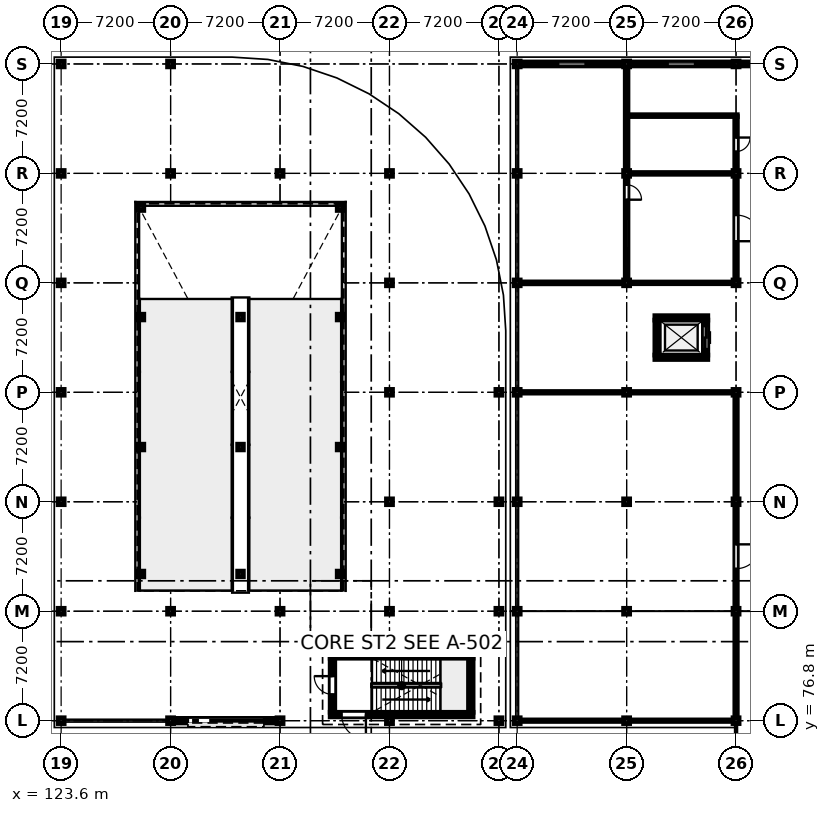
"""IFC4 building model, lengths in metres.
Left out: names, types, materials, properties, quantities, classifications, styles, units other than length and angle.
Written with IfcOpenShell. Run it as: python <this file> out.ifc"""

import sys

from ifc_helpers import new_model, si_unit, direction, frame, frame_2d, origin, origin_2d, place, context, subcontext, project, spatial, rectangle, i_section, extrude, element, fill, save


model = new_model("IFC4")
c1 = context("Model", 3, precision=1e-05, world=origin(), true_north=direction((0.0, 1.0)))
c2 = subcontext(c1, "Body", "Model", "MODEL_VIEW")
j1 = project(units=[si_unit("LENGTHUNIT", "METRE"), si_unit("PLANEANGLEUNIT", "RADIAN")], contexts=[c1])
p1 = place(None, origin())
s1 = spatial("IfcSite", under=j1, at=p1, CompositionType="ELEMENT")
p2 = place(p1, origin())
s2 = spatial("IfcBuilding", under=s1, at=p2, CompositionType="ELEMENT")
p3 = place(p2, origin())
s3 = spatial("IfcBuildingStorey", under=s2, at=p3, CompositionType="ELEMENT", Elevation=0.0)
for number, where, z_axis, x_axis in (
    (1, (123.6, 76.8, 0.0), (0.0, 0.0, 1.0), (1.0, 0.0, 0.0)),
    (2, (123.6, 84.0, 0.0), (0.0, 0.0, 1.0), (1.0, 0.0, 0.0)),
    (3, (123.6, 91.2, 0.0), (0.0, 0.0, 1.0), (1.0, 0.0, 0.0)),
    (4, (123.6, 98.4, 0.0), (0.0, 0.0, 1.0), (1.0, 0.0, 0.0)),
    (5, (123.6, 105.6, 0.0), (0.0, 0.0, 1.0), (1.0, 0.0, 0.0)),
    (6, (123.6, 112.8, 0.0), (0.0, 0.0, 1.0), (1.0, 0.0, 0.0)),
    (7, (123.6, 120.0, 0.0), (0.0, 0.0, 1.0), (1.0, 0.0, 0.0)),
    (8, (130.8, 76.8, 0.0), (0.0, 0.0, 1.0), (1.0, 0.0, 0.0)),
    (9, (130.8, 84.0, 0.0), (0.0, 0.0, 1.0), (1.0, 0.0, 0.0)),
    (10, (130.8, 112.8, 0.0), (0.0, 0.0, 1.0), (1.0, 0.0, 0.0)),
    (11, (130.8, 120.0, 0.0), (0.0, 0.0, 1.0), (1.0, 0.0, 0.0)),
    (12, (138.0, 76.8, 0.0), (0.0, 0.0, 1.0), (1.0, 0.0, 0.0)),
    (13, (138.0, 84.0, 0.0), (0.0, 0.0, 1.0), (1.0, 0.0, 0.0)),
    (14, (138.0, 112.8, 0.0), (0.0, 0.0, 1.0), (1.0, 0.0, 0.0)),
    (15, (145.2, 76.8, 0.0), (0.0, 0.0, 1.0), (1.0, 0.0, 0.0)),
    (16, (145.2, 84.0, 0.0), (0.0, 0.0, 1.0), (1.0, 0.0, 0.0)),
    (17, (145.2, 91.2, 0.0), (0.0, 0.0, 1.0), (1.0, 0.0, 0.0)),
    (18, (145.2, 98.4, 0.0), (0.0, 0.0, 1.0), (1.0, 0.0, 0.0)),
    (19, (145.2, 105.6, 0.0), (0.0, 0.0, 1.0), (1.0, 0.0, 0.0)),
    (20, (145.2, 112.8, 0.0), (0.0, 0.0, 1.0), (1.0, 0.0, 0.0)),
    (21, (152.4, 76.8, 0.0), (0.0, 0.0, 1.0), (1.0, 0.0, 0.0)),
    (22, (152.4, 84.0, 0.0), (0.0, 0.0, 1.0), (1.0, 0.0, 0.0)),
    (23, (152.4, 91.2, 0.0), (0.0, 0.0, 1.0), (1.0, 0.0, 0.0)),
    (24, (152.4, 98.4, 0.0), (0.0, 0.0, 1.0), (1.0, 0.0, 0.0)),
):
    element("IfcColumn", number, at=place(p3, frame(where, z_axis=z_axis, x_axis=x_axis)), inside=s3, PredefinedType="COLUMN", context=c2, shape_type="SweptSolid", body=[
        extrude(i_section(OverallWidth=0.396, OverallDepth=0.381, WebThickness=0.019, FlangeThickness=0.03, FilletRadius=0.015, at=origin_2d()), origin(), (0.0, 0.0, 1.0), 5.4),
    ])
for number, where, z_axis, x_axis in (
    (25, (128.85, 86.45, 0.0), (0.0, 0.0, 1.0), (1.0, 0.0, 0.0)),
    (26, (135.4, 86.45, 0.0), (0.0, 0.0, 1.0), (1.0, 0.0, 0.0)),
    (27, (141.95, 86.45, 0.0), (0.0, 0.0, 1.0), (1.0, 0.0, 0.0)),
    (28, (128.85, 94.8, 0.0), (0.0, 0.0, 1.0), (1.0, 0.0, 0.0)),
    (29, (135.4, 94.8, 0.0), (0.0, 0.0, 1.0), (1.0, 0.0, 0.0)),
    (30, (141.95, 94.8, 0.0), (0.0, 0.0, 1.0), (1.0, 0.0, 0.0)),
    (31, (128.85, 103.35, 0.0), (0.0, 0.0, 1.0), (1.0, 0.0, 0.0)),
    (32, (135.4, 103.35, 0.0), (0.0, 0.0, 1.0), (1.0, 0.0, 0.0)),
    (33, (141.95, 103.35, 0.0), (0.0, 0.0, 1.0), (1.0, 0.0, 0.0)),
    (34, (128.85, 110.55, 0.0), (0.0, 0.0, 1.0), (1.0, 0.0, 0.0)),
    (35, (141.95, 110.55, 0.0), (0.0, 0.0, 1.0), (1.0, 0.0, 0.0)),
):
    element("IfcColumn", number, at=place(p3, frame(where, z_axis=z_axis, x_axis=x_axis)), inside=s3, PredefinedType="COLUMN", context=c2, shape_type="SweptSolid", body=[
        extrude(i_section(OverallWidth=0.373, OverallDepth=0.373, WebThickness=0.016, FlangeThickness=0.026, FilletRadius=0.015, at=origin_2d()), origin(), (0.0, 0.0, 1.0), 5.4),
    ])
for number, where, z_axis, x_axis in (
    (36, (153.6, 76.8, 0.0), (0.0, 0.0, 1.0), (1.0, 0.0, 0.0)),
    (37, (153.6, 84.0, 0.0), (0.0, 0.0, 1.0), (1.0, 0.0, 0.0)),
    (38, (153.6, 91.2, 0.0), (0.0, 0.0, 1.0), (1.0, 0.0, 0.0)),
    (39, (153.6, 98.4, 0.0), (0.0, 0.0, 1.0), (1.0, 0.0, 0.0)),
    (40, (153.6, 105.6, 0.0), (0.0, 0.0, 1.0), (1.0, 0.0, 0.0)),
    (41, (153.6, 112.8, 0.0), (0.0, 0.0, 1.0), (1.0, 0.0, 0.0)),
    (42, (153.6, 120.0, 0.0), (0.0, 0.0, 1.0), (1.0, 0.0, 0.0)),
    (43, (160.8, 76.8, 0.0), (0.0, 0.0, 1.0), (1.0, 0.0, 0.0)),
    (44, (160.8, 84.0, 0.0), (0.0, 0.0, 1.0), (1.0, 0.0, 0.0)),
    (45, (160.8, 91.2, 0.0), (0.0, 0.0, 1.0), (1.0, 0.0, 0.0)),
    (46, (160.8, 98.4, 0.0), (0.0, 0.0, 1.0), (1.0, 0.0, 0.0)),
    (47, (160.8, 105.6, 0.0), (0.0, 0.0, 1.0), (1.0, 0.0, 0.0)),
    (48, (160.8, 112.8, 0.0), (0.0, 0.0, 1.0), (1.0, 0.0, 0.0)),
    (49, (160.8, 120.0, 0.0), (0.0, 0.0, 1.0), (1.0, 0.0, 0.0)),
    (50, (168.0, 76.8, 0.0), (0.0, 0.0, 1.0), (1.0, 0.0, 0.0)),
    (51, (168.0, 84.0, 0.0), (0.0, 0.0, 1.0), (1.0, 0.0, 0.0)),
    (52, (168.0, 91.2, 0.0), (0.0, 0.0, 1.0), (1.0, 0.0, 0.0)),
    (53, (168.0, 98.4, 0.0), (0.0, 0.0, 1.0), (1.0, 0.0, 0.0)),
    (54, (168.0, 105.6, 0.0), (0.0, 0.0, 1.0), (1.0, 0.0, 0.0)),
    (55, (168.0, 112.8, 0.0), (0.0, 0.0, 1.0), (1.0, 0.0, 0.0)),
    (56, (168.0, 120.0, 0.0), (0.0, 0.0, 1.0), (1.0, 0.0, 0.0)),
):
    element("IfcColumn", number, at=place(p3, frame(where, z_axis=z_axis, x_axis=x_axis)), inside=s3, PredefinedType="COLUMN", context=c2, shape_type="SweptSolid", body=[
        extrude(i_section(OverallWidth=0.396, OverallDepth=0.381, WebThickness=0.019, FlangeThickness=0.03, FilletRadius=0.015, at=origin_2d()), origin(), (0.0, 0.0, 1.0), 5.4),
    ])
p4 = place(p3, frame((137.795, 76.8, 0.0), z_axis=(0.0, 0.0, 1.0), x_axis=(-1.0, 0.0, 0.0)))
e57 = element("IfcWall", 57, at=p4, inside=s3, PredefinedType="STANDARD", context=c2, shape_type="SweptSolid", body=[
    extrude(rectangle(XDim=6.79, YDim=0.3, at=frame_2d((3.395, 0.0))), origin(), (0.0, 0.0, 1.0), 4.523),
])
p5 = place(p4, frame((0.855, 0.0, 0.0)))
e58 = element("IfcOpeningElement", 58, at=p5, cuts=e57, PredefinedType="OPENING", context=c2, shape_type="SweptSolid", body=[
    extrude(rectangle(XDim=5.0, YDim=4.1, at=frame_2d((2.5, 2.05))), frame((0.0, 0.16, 0.0), z_axis=(0.0, -1.0, 0.0), x_axis=(1.0, 0.0, 0.0)), (0.0, 0.0, 1.0), 0.32),
])
p6 = place(p3, frame((153.805, 120.0, 0.0), z_axis=(0.0, 0.0, 1.0), x_axis=(1.0, 0.0, 0.0)))
e59 = element("IfcWall", 59, at=p6, inside=s3, PredefinedType="STANDARD", context=c2, shape_type="SweptSolid", body=[
    extrude(rectangle(XDim=6.79, YDim=0.26, at=frame_2d((3.395, 0.0))), origin(), (0.0, 0.0, 1.0), 4.442),
])
p7 = place(p6, frame((2.495, 0.0, 0.9)))
e60 = element("IfcOpeningElement", 60, at=p7, cuts=e59, PredefinedType="OPENING", context=c2, shape_type="SweptSolid", body=[
    extrude(rectangle(XDim=1.8, YDim=1.5, at=frame_2d((0.9, 0.75))), frame((0.0, 0.14, 0.0), z_axis=(0.0, -1.0, 0.0), x_axis=(1.0, 0.0, 0.0)), (0.0, 0.0, 1.0), 0.28),
])
p8 = place(p3, frame((161.005, 120.0, 0.0), z_axis=(0.0, 0.0, 1.0), x_axis=(1.0, 0.0, 0.0)))
e61 = element("IfcWall", 61, at=p8, inside=s3, PredefinedType="STANDARD", context=c2, shape_type="SweptSolid", body=[
    extrude(rectangle(XDim=6.79, YDim=0.26, at=frame_2d((3.395, 0.0))), origin(), (0.0, 0.0, 1.0), 4.442),
])
p9 = place(p8, frame((2.495, 0.0, 0.9)))
e62 = element("IfcOpeningElement", 62, at=p9, cuts=e61, PredefinedType="OPENING", context=c2, shape_type="SweptSolid", body=[
    extrude(rectangle(XDim=1.8, YDim=1.5, at=frame_2d((0.9, 0.75))), frame((0.0, 0.14, 0.0), z_axis=(0.0, -1.0, 0.0), x_axis=(1.0, 0.0, 0.0)), (0.0, 0.0, 1.0), 0.28),
])
p10 = place(p3, frame((168.205, 120.0, 0.0), z_axis=(0.0, 0.0, 1.0), x_axis=(1.0, 0.0, 0.0)))
e63 = element("IfcWall", 63, at=p10, inside=s3, PredefinedType="STANDARD", context=c2, shape_type="SweptSolid", body=[
    extrude(rectangle(XDim=6.79, YDim=0.26, at=frame_2d((3.395, 0.0))), origin(), (0.0, 0.0, 1.0), 4.442),
])
p11 = place(p10, frame((2.495, 0.0, 0.9)))
e64 = element("IfcOpeningElement", 64, at=p11, cuts=e63, PredefinedType="OPENING", context=c2, shape_type="SweptSolid", body=[
    extrude(rectangle(XDim=1.8, YDim=1.5, at=frame_2d((0.9, 0.75))), frame((0.0, 0.14, 0.0), z_axis=(0.0, -1.0, 0.0), x_axis=(1.0, 0.0, 0.0)), (0.0, 0.0, 1.0), 0.28),
])
p12 = place(p3, frame((150.7, 77.2, 0.0), z_axis=(0.0, 0.0, 1.0), x_axis=(-1.0, 0.0, 0.0)))
e65 = element("IfcWall", 65, at=p12, inside=s3, PredefinedType="SOLIDWALL", context=c2, shape_type="SweptSolid", body=[
    extrude(rectangle(XDim=9.4, YDim=0.3, at=frame_2d((4.7, 0.0))), origin(), (0.0, 0.0, 1.0), 5.15),
])
p13 = place(p12, frame((7.05, 0.0, 0.0)))
e66 = element("IfcOpeningElement", 66, at=p13, cuts=e65, PredefinedType="OPENING", context=c2, shape_type="SweptSolid", body=[
    extrude(rectangle(XDim=1.6, YDim=2.15, at=frame_2d((0.8, 1.075))), frame((0.0, 0.16, 0.0), z_axis=(0.0, -1.0, 0.0), x_axis=(1.0, 0.0, 0.0)), (0.0, 0.0, 1.0), 0.32),
])
p14 = place(p3, frame((141.3, 81.06, 0.0), z_axis=(0.0, 0.0, 1.0), x_axis=(1.0, 0.0, 0.0)))
e67 = element("IfcWall", 67, at=p14, inside=s3, PredefinedType="SOLIDWALL", context=c2, shape_type="SweptSolid", body=[
    extrude(rectangle(XDim=9.4, YDim=0.3, at=frame_2d((4.7, 0.0))), origin(), (0.0, 0.0, 1.0), 5.15),
])
p15 = place(p3, frame((141.45, 77.35, 0.0), z_axis=(0.0, 0.0, 1.0), x_axis=(0.0, 1.0, 0.0)))
e68 = element("IfcWall", 68, at=p15, inside=s3, PredefinedType="SOLIDWALL", context=c2, shape_type="SweptSolid", body=[
    extrude(rectangle(XDim=3.56, YDim=0.3, at=frame_2d((1.78, 0.0))), origin(), (0.0, 0.0, 1.0), 5.15),
])
p16 = place(p15, frame((1.18, 0.0, 0.0)))
e69 = element("IfcOpeningElement", 69, at=p16, cuts=e68, PredefinedType="OPENING", context=c2, shape_type="SweptSolid", body=[
    extrude(rectangle(XDim=1.2, YDim=2.2, at=frame_2d((0.6, 1.1))), frame((0.0, 0.16, 0.0), z_axis=(0.0, -1.0, 0.0), x_axis=(1.0, 0.0, 0.0)), (0.0, 0.0, 1.0), 0.32),
])
p17 = place(p3, frame((150.55, 80.91, 0.0), z_axis=(0.0, 0.0, 1.0), x_axis=(0.0, -1.0, 0.0)))
e70 = element("IfcWall", 70, at=p17, inside=s3, PredefinedType="SOLIDWALL", context=c2, shape_type="SweptSolid", body=[
    extrude(rectangle(XDim=3.56, YDim=0.3, at=frame_2d((1.78, 0.0))), origin(), (0.0, 0.0, 1.0), 5.15),
])
for number, where, z_axis, x_axis in (
    (71, (166.14, 100.705, 0.0), (0.0, 0.0, 1.0), (-1.0, 0.0, 0.0)),
    (72, (162.66, 103.295, 0.0), (0.0, 0.0, 1.0), (1.0, 0.0, 0.0)),
):
    element("IfcWall", number, at=place(p3, frame(where, z_axis=z_axis, x_axis=x_axis)), inside=s3, PredefinedType="SHEAR", context=c2, shape_type="SweptSolid", body=[
        extrude(rectangle(XDim=3.48, YDim=0.29, at=frame_2d((1.74, 0.0))), origin(), (0.0, 0.0, 1.0), 5.14),
    ])
p18 = place(p3, frame((162.805, 100.85, 0.0), z_axis=(0.0, 0.0, 1.0), x_axis=(0.0, 1.0, 0.0)))
e73 = element("IfcWall", 73, at=p18, inside=s3, PredefinedType="SHEAR", context=c2, shape_type="SweptSolid", body=[
    extrude(rectangle(XDim=2.3, YDim=0.29, at=frame_2d((1.15, 0.0))), origin(), (0.0, 0.0, 1.0), 5.14),
])
p19 = place(p3, frame((165.995, 103.15, 0.0), z_axis=(0.0, 0.0, 1.0), x_axis=(0.0, -1.0, 0.0)))
e74 = element("IfcWall", 74, at=p19, inside=s3, PredefinedType="SHEAR", context=c2, shape_type="SweptSolid", body=[
    extrude(rectangle(XDim=2.3, YDim=0.29, at=frame_2d((1.15, 0.0))), origin(), (0.0, 0.0, 1.0), 5.14),
])
p20 = place(p19, frame((0.4, 0.0, 0.0)))
e75 = element("IfcOpeningElement", 75, at=p20, cuts=e74, PredefinedType="OPENING", context=c2, shape_type="SweptSolid", body=[
    extrude(rectangle(XDim=1.5, YDim=2.3, at=frame_2d((0.75, 1.15))), frame((0.0, 0.155, 0.0), z_axis=(0.0, -1.0, 0.0), x_axis=(1.0, 0.0, 0.0)), (0.0, 0.0, 1.0), 0.31),
])
p21 = place(p3, frame((168.08, 76.8, 0.0), z_axis=(0.0, 0.0, 1.0), x_axis=(-1.0, 0.0, 0.0)))
e76 = element("IfcWall", 76, at=p21, inside=s3, PredefinedType="PARTITIONING", context=c2, shape_type="SweptSolid", body=[
    extrude(rectangle(XDim=14.348, YDim=0.1, at=frame_2d((7.174, 0.0))), origin(), (0.0, 0.0, 1.0), 4.437),
])
p22 = place(p3, frame((153.732, 98.4, 0.0), z_axis=(0.0, 0.0, 1.0), x_axis=(1.0, 0.0, 0.0)))
e77 = element("IfcWall", 77, at=p22, inside=s3, PredefinedType="PARTITIONING", context=c2, shape_type="SweptSolid", body=[
    extrude(rectangle(XDim=14.348, YDim=0.105, at=frame_2d((7.174, 0.0))), origin(), (0.0, 0.0, 1.0), 4.437),
])
p23 = place(p3, frame((168.08, 105.6, 0.0), z_axis=(0.0, 0.0, 1.0), x_axis=(-1.0, 0.0, 0.0)))
e78 = element("IfcWall", 78, at=p23, inside=s3, PredefinedType="PARTITIONING", context=c2, shape_type="SweptSolid", body=[
    extrude(rectangle(XDim=7.36, YDim=0.11, at=frame_2d((3.68, 0.0))), origin(), (0.0, 0.0, 1.0), 4.437),
])
p24 = place(p3, frame((160.895, 112.8, 0.0), z_axis=(0.0, 0.0, 1.0), x_axis=(1.0, 0.0, 0.0)))
e79 = element("IfcWall", 79, at=p24, inside=s3, PredefinedType="PARTITIONING", context=c2, shape_type="SweptSolid", body=[
    extrude(rectangle(XDim=7.185, YDim=0.115, at=frame_2d((3.593, 0.0))), origin(), (0.0, 0.0, 1.0), 4.437),
])
p25 = place(p3, frame((160.895, 116.6, 0.0), z_axis=(0.0, 0.0, 1.0), x_axis=(1.0, 0.0, 0.0)))
e80 = element("IfcWall", 80, at=p25, inside=s3, PredefinedType="PARTITIONING", context=c2, shape_type="SweptSolid", body=[
    extrude(rectangle(XDim=7.185, YDim=0.12, at=frame_2d((3.593, 0.0))), origin(), (0.0, 0.0, 1.0), 4.437),
])
p26 = place(p3, frame((160.718, 105.6, 0.0), z_axis=(0.0, 0.0, 1.0), x_axis=(-1.0, 0.0, 0.0)))
e81 = element("IfcWall", 81, at=p26, inside=s3, PredefinedType="PARTITIONING", context=c2, shape_type="SweptSolid", body=[
    extrude(rectangle(XDim=6.986, YDim=0.125, at=frame_2d((3.493, 0.0))), origin(), (0.0, 0.0, 1.0), 4.437),
])
p27 = place(p3, frame((168.0, 98.346, 0.0), z_axis=(0.0, 0.0, 1.0), x_axis=(0.0, -1.0, 0.0)))
e82 = element("IfcWall", 82, at=p27, inside=s3, PredefinedType="PARTITIONING", context=c2, shape_type="SweptSolid", body=[
    extrude(rectangle(XDim=21.494, YDim=0.16, at=frame_2d((10.747, 0.0))), origin(), (0.0, 0.0, 1.0), 4.437),
])
p28 = place(p27, frame((9.947, 0.0, 0.0)))
e83 = element("IfcOpeningElement", 83, at=p28, cuts=e82, PredefinedType="OPENING", context=c2, shape_type="SweptSolid", body=[
    extrude(rectangle(XDim=1.6, YDim=2.22, at=frame_2d((0.8, 1.11))), frame((0.0, 0.09, 0.0), z_axis=(0.0, -1.0, 0.0), x_axis=(1.0, 0.0, 0.0)), (0.0, 0.0, 1.0), 0.18),
])
p29 = place(p3, frame((168.0, 112.74, 0.0), z_axis=(0.0, 0.0, 1.0), x_axis=(0.0, -1.0, 0.0)))
e84 = element("IfcWall", 84, at=p29, inside=s3, PredefinedType="PARTITIONING", context=c2, shape_type="SweptSolid", body=[
    extrude(rectangle(XDim=7.083, YDim=0.165, at=frame_2d((3.542, 0.0))), origin(), (0.0, 0.0, 1.0), 4.437),
])
p30 = place(p29, frame((2.681, 0.0, 0.0)))
e85 = element("IfcOpeningElement", 85, at=p30, cuts=e84, PredefinedType="OPENING", context=c2, shape_type="SweptSolid", body=[
    extrude(rectangle(XDim=1.72, YDim=2.22, at=frame_2d((0.86, 1.11))), frame((0.0, 0.093, 0.0), z_axis=(0.0, -1.0, 0.0), x_axis=(1.0, 0.0, 0.0)), (0.0, 0.0, 1.0), 0.185),
])
p31 = place(p3, frame((168.0, 116.538, 0.0), z_axis=(0.0, 0.0, 1.0), x_axis=(0.0, -1.0, 0.0)))
e86 = element("IfcWall", 86, at=p31, inside=s3, PredefinedType="PARTITIONING", context=c2, shape_type="SweptSolid", body=[
    extrude(rectangle(XDim=3.678, YDim=0.17, at=frame_2d((1.839, 0.0))), origin(), (0.0, 0.0, 1.0), 4.437),
])
p32 = place(p31, frame((1.379, 0.0, 0.0)))
e87 = element("IfcOpeningElement", 87, at=p32, cuts=e86, PredefinedType="OPENING", context=c2, shape_type="SweptSolid", body=[
    extrude(rectangle(XDim=0.92, YDim=2.28, at=frame_2d((0.46, 1.14))), frame((0.0, 0.095, 0.0), z_axis=(0.0, -1.0, 0.0), x_axis=(1.0, 0.0, 0.0)), (0.0, 0.0, 1.0), 0.19),
])
p33 = place(p3, frame((160.8, 119.858, 0.0), z_axis=(0.0, 0.0, 1.0), x_axis=(0.0, -1.0, 0.0)))
e88 = element("IfcWall", 88, at=p33, inside=s3, PredefinedType="PARTITIONING", context=c2, shape_type="SweptSolid", body=[
    extrude(rectangle(XDim=14.194, YDim=0.178, at=frame_2d((7.097, 0.0))), origin(), (0.0, 0.0, 1.0), 4.437),
])
p34 = place(p33, frame((7.807, 0.0, 0.0)))
e89 = element("IfcOpeningElement", 89, at=p34, cuts=e88, PredefinedType="OPENING", context=c2, shape_type="SweptSolid", body=[
    extrude(rectangle(XDim=0.98, YDim=2.28, at=frame_2d((0.49, 1.14))), frame((0.0, 0.099, 0.0), z_axis=(0.0, -1.0, 0.0), x_axis=(1.0, 0.0, 0.0)), (0.0, 0.0, 1.0), 0.198),
])
p35 = place(p33, frame((10.037, 0.0, 0.95)))
e90 = element("IfcOpeningElement", 90, at=p35, cuts=e88, PredefinedType="OPENING", context=c2, shape_type="SweptSolid", body=[
    extrude(rectangle(XDim=1.95, YDim=1.3, at=frame_2d((0.975, 0.65))), frame((0.0, 0.099, 0.0), z_axis=(0.0, -1.0, 0.0), x_axis=(1.0, 0.0, 0.0)), (0.0, 0.0, 1.0), 0.198),
])
p36 = place(p5, origin())
e91 = element("IfcDoor", 91, at=p36, inside=s3, OperationType="ROLLINGUP", PredefinedType="GATE", context=c2, shape_type="SweptSolid", body=[
    extrude(rectangle(XDim=5.0, YDim=4.1, at=frame_2d((2.5, 2.05))), frame((0.0, 0.025, 0.0), z_axis=(0.0, -1.0, 0.0), x_axis=(1.0, 0.0, 0.0)), (0.0, 0.0, 1.0), 0.05),
])
fill(e58, e91)
p37 = place(p7, origin())
e92 = element("IfcWindow", 92, at=p37, inside=s3, PartitioningType="SINGLE_PANEL", PredefinedType="WINDOW", context=c2, shape_type="SweptSolid", body=[
    extrude(rectangle(XDim=1.8, YDim=1.5, at=frame_2d((0.9, 0.75))), frame((0.0, 0.03, 0.0), z_axis=(0.0, -1.0, 0.0), x_axis=(1.0, 0.0, 0.0)), (0.0, 0.0, 1.0), 0.06),
])
fill(e60, e92)
p38 = place(p9, origin())
e93 = element("IfcWindow", 93, at=p38, inside=s3, PartitioningType="SINGLE_PANEL", PredefinedType="WINDOW", context=c2, shape_type="SweptSolid", body=[
    extrude(rectangle(XDim=1.8, YDim=1.5, at=frame_2d((0.9, 0.75))), frame((0.0, 0.03, 0.0), z_axis=(0.0, -1.0, 0.0), x_axis=(1.0, 0.0, 0.0)), (0.0, 0.0, 1.0), 0.06),
])
fill(e62, e93)
p39 = place(p13, origin())
e94 = element("IfcDoor", 94, at=p39, inside=s3, OperationType="SINGLE_SWING_LEFT", PredefinedType="DOOR", context=c2, shape_type="SweptSolid", body=[
    extrude(rectangle(XDim=1.6, YDim=2.15, at=frame_2d((0.8, 1.075))), frame((0.0, 0.025, 0.0), z_axis=(0.0, -1.0, 0.0), x_axis=(1.0, 0.0, 0.0)), (0.0, 0.0, 1.0), 0.05),
])
fill(e66, e94)
p40 = place(p16, origin())
e95 = element("IfcDoor", 95, at=p40, inside=s3, OperationType="SINGLE_SWING_RIGHT", PredefinedType="DOOR", context=c2, shape_type="SweptSolid", body=[
    extrude(rectangle(XDim=1.2, YDim=2.2, at=frame_2d((0.6, 1.1))), frame((0.0, 0.025, 0.0), z_axis=(0.0, -1.0, 0.0), x_axis=(1.0, 0.0, 0.0)), (0.0, 0.0, 1.0), 0.05),
])
fill(e69, e95)
p41 = place(p20, origin())
e96 = element("IfcDoor", 96, at=p41, inside=s3, OperationType="DOUBLE_DOOR_SLIDING", PredefinedType="DOOR", context=c2, shape_type="SweptSolid", body=[
    extrude(rectangle(XDim=1.5, YDim=2.3, at=frame_2d((0.75, 1.15))), frame((0.0, 0.025, 0.0), z_axis=(0.0, -1.0, 0.0), x_axis=(1.0, 0.0, 0.0)), (0.0, 0.0, 1.0), 0.05),
])
fill(e75, e96)
p42 = place(p28, origin())
e97 = element("IfcDoor", 97, at=p42, inside=s3, OperationType="SINGLE_SWING_LEFT", PredefinedType="DOOR", context=c2, shape_type="SweptSolid", body=[
    extrude(rectangle(XDim=1.6, YDim=2.22, at=frame_2d((0.8, 1.11))), frame((0.0, 0.025, 0.0), z_axis=(0.0, -1.0, 0.0), x_axis=(1.0, 0.0, 0.0)), (0.0, 0.0, 1.0), 0.05),
])
fill(e83, e97)
p43 = place(p30, origin())
e98 = element("IfcDoor", 98, at=p43, inside=s3, OperationType="SINGLE_SWING_RIGHT", PredefinedType="DOOR", context=c2, shape_type="SweptSolid", body=[
    extrude(rectangle(XDim=1.72, YDim=2.22, at=frame_2d((0.86, 1.11))), frame((0.0, 0.025, 0.0), z_axis=(0.0, -1.0, 0.0), x_axis=(1.0, 0.0, 0.0)), (0.0, 0.0, 1.0), 0.05),
])
fill(e85, e98)
p44 = place(p32, origin())
e99 = element("IfcDoor", 99, at=p44, inside=s3, OperationType="SINGLE_SWING_LEFT", PredefinedType="DOOR", context=c2, shape_type="SweptSolid", body=[
    extrude(rectangle(XDim=0.92, YDim=2.28, at=frame_2d((0.46, 1.14))), frame((0.0, 0.025, 0.0), z_axis=(0.0, -1.0, 0.0), x_axis=(1.0, 0.0, 0.0)), (0.0, 0.0, 1.0), 0.05),
])
fill(e87, e99)
p45 = place(p34, origin())
e100 = element("IfcDoor", 100, at=p45, inside=s3, OperationType="SINGLE_SWING_RIGHT", PredefinedType="DOOR", context=c2, shape_type="SweptSolid", body=[
    extrude(rectangle(XDim=0.98, YDim=2.28, at=frame_2d((0.49, 1.14))), frame((0.0, 0.025, 0.0), z_axis=(0.0, -1.0, 0.0), x_axis=(1.0, 0.0, 0.0)), (0.0, 0.0, 1.0), 0.05),
])
fill(e89, e100)
p46 = place(p35, origin())
e101 = element("IfcWindow", 101, at=p46, inside=s3, PartitioningType="SINGLE_PANEL", PredefinedType="WINDOW", context=c2, shape_type="SweptSolid", body=[
    extrude(rectangle(XDim=1.95, YDim=1.3, at=frame_2d((0.975, 0.65))), frame((0.0, 0.03, 0.0), z_axis=(0.0, -1.0, 0.0), x_axis=(1.0, 0.0, 0.0)), (0.0, 0.0, 1.0), 0.06),
])
fill(e90, e101)
save(model, sys.argv[1])
